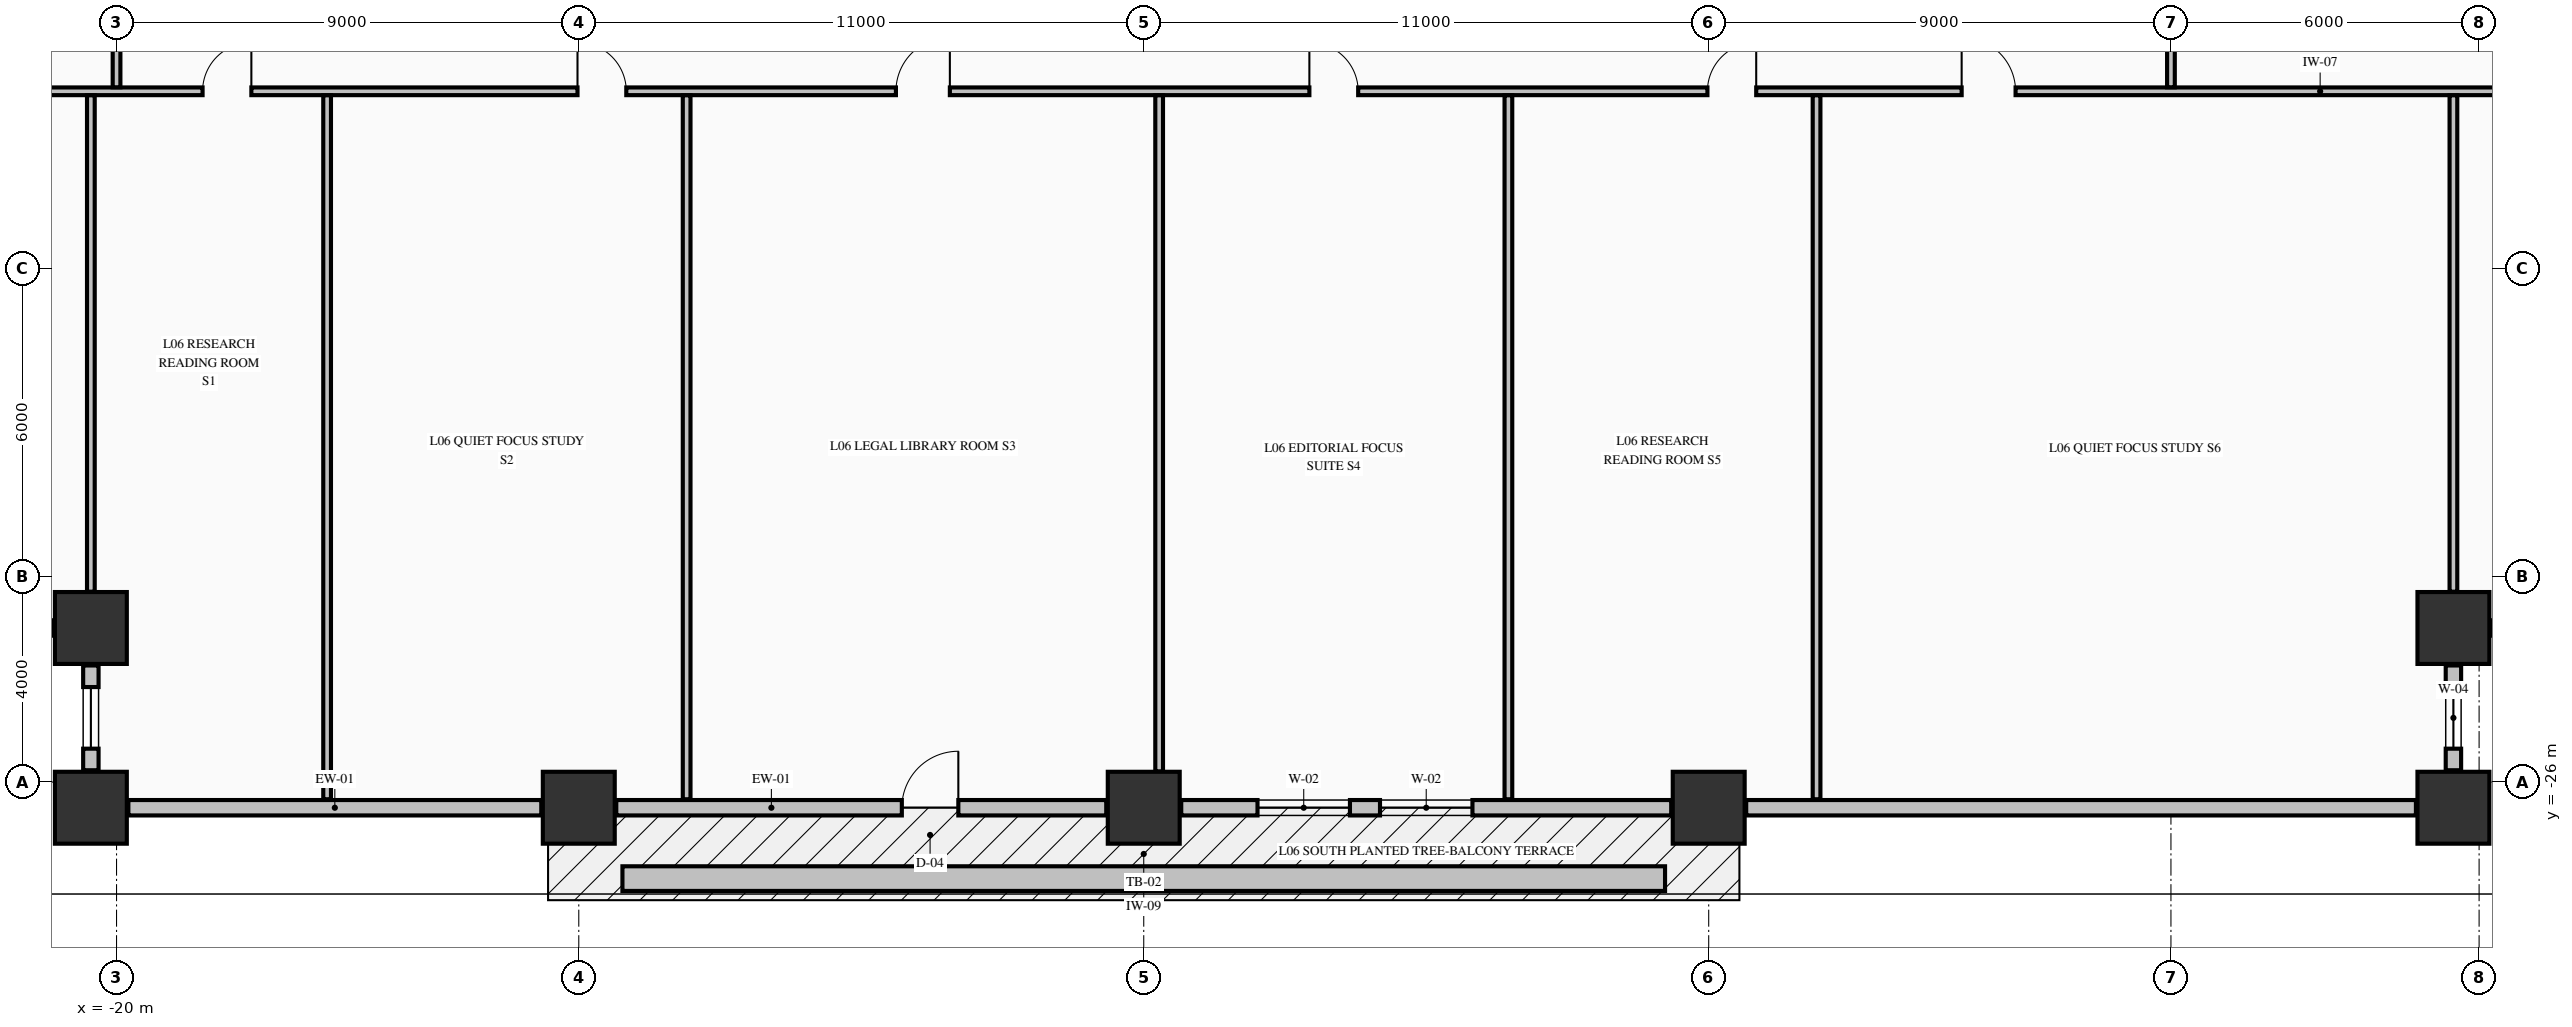
"""IFC4 building model, lengths in metres.
Left out: names, types, materials, properties, quantities, classifications, styles, units other than length and angle.
Written with IfcOpenShell. Run it as: python <this file> out.ifc"""

import sys

from ifc_helpers import new_model, si_unit, direction, frame, frame_2d, origin, origin_2d, place, context, subcontext, project, spatial, rectangle, extrude, element, fill, save


model = new_model("IFC4")
c1 = context("Model", 3, precision=1e-05, world=origin(), true_north=direction((0.0, 1.0)))
c2 = subcontext(c1, "Body", "Model", "MODEL_VIEW")
j1 = project(units=[si_unit("LENGTHUNIT", "METRE"), si_unit("PLANEANGLEUNIT", "RADIAN")], contexts=[c1])
p1 = place(None, origin())
s1 = spatial("IfcSite", under=j1, at=p1, CompositionType="ELEMENT")
p2 = place(p1, origin())
s2 = spatial("IfcBuilding", under=s1, at=p2, CompositionType="ELEMENT")
p3 = place(p2, frame((0.0, 0.0, 30.77)))
s3 = spatial("IfcBuildingStorey", under=s2, at=p3, CompositionType="ELEMENT", Elevation=30.77)
for number, where, z_axis, x_axis in (
    (1, (-20.5, -26.5, -0.25), (0.0, 0.0, 1.0), (1.0, 0.0, 0.0)),
    (2, (-11.0, -26.5, -0.25), (0.0, 0.0, 1.0), (1.0, 0.0, 0.0)),
    (3, (0.0, -26.5, -0.25), (0.0, 0.0, 1.0), (1.0, 0.0, 0.0)),
    (4, (11.0, -26.5, -0.25), (0.0, 0.0, 1.0), (1.0, 0.0, 0.0)),
    (5, (25.5, -26.5, -0.25), (0.0, 0.0, 1.0), (1.0, 0.0, 0.0)),
    (6, (-20.5, -23.0, -0.25), (0.0, 0.0, 1.0), (1.0, 0.0, 0.0)),
    (7, (25.5, -23.0, -0.25), (0.0, 0.0, 1.0), (1.0, 0.0, 0.0)),
):
    element("IfcColumn", number, at=place(p3, frame(where, z_axis=z_axis, x_axis=x_axis)), inside=s3, PredefinedType="COLUMN", context=c2, shape_type="SweptSolid", body=[
        extrude(rectangle(XDim=1.4, YDim=1.4, at=origin_2d()), origin(), (0.0, 0.0, 1.0), 3.52),
    ])
p4 = place(p3, frame((25.5, -25.77, 0.0), z_axis=(0.0, 0.0, 1.0), x_axis=(0.0, 1.0, 0.0)))
e8 = element("IfcWall", 8, at=p4, inside=s3, PredefinedType="STANDARD", context=c2, shape_type="SweptSolid", body=[
    extrude(rectangle(XDim=2.04, YDim=0.3, at=frame_2d((1.02, 0.0))), origin(), (0.0, 0.0, 1.0), 2.662),
])
p5 = place(p4, frame((0.42, 0.0, 0.82)))
e9 = element("IfcOpeningElement", 9, at=p5, cuts=e8, PredefinedType="OPENING", context=c2, shape_type="SweptSolid", body=[
    extrude(rectangle(XDim=1.2, YDim=1.65, at=frame_2d((0.6, 0.825))), frame((0.0, 0.16, 0.0), z_axis=(0.0, -1.0, 0.0), x_axis=(1.0, 0.0, 0.0)), (0.0, 0.0, 1.0), 0.32),
])
p6 = place(p3, frame((26.23, -23.0, 0.0), z_axis=(0.0, 0.0, 1.0), x_axis=(1.0, 0.0, 0.0)))
e10 = element("IfcWall", 10, at=p6, inside=s3, PredefinedType="STANDARD", context=c2, shape_type="SweptSolid", body=[
    extrude(rectangle(XDim=2.04, YDim=0.3, at=frame_2d((1.02, 0.0))), origin(), (0.0, 0.0, 1.0), 2.662),
])
p7 = place(p6, frame((0.42, 0.0, 0.82)))
e11 = element("IfcOpeningElement", 11, at=p7, cuts=e10, PredefinedType="OPENING", context=c2, shape_type="SweptSolid", body=[
    extrude(rectangle(XDim=1.2, YDim=1.65, at=frame_2d((0.6, 0.825))), frame((0.0, 0.16, 0.0), z_axis=(0.0, -1.0, 0.0), x_axis=(1.0, 0.0, 0.0)), (0.0, 0.0, 1.0), 0.32),
])
p8 = place(p3, frame((-23.27, -23.0, 0.0), z_axis=(0.0, 0.0, 1.0), x_axis=(1.0, 0.0, 0.0)))
e12 = element("IfcWall", 12, at=p8, inside=s3, PredefinedType="STANDARD", context=c2, shape_type="SweptSolid", body=[
    extrude(rectangle(XDim=2.04, YDim=0.3, at=frame_2d((1.02, 0.0))), origin(), (0.0, 0.0, 1.0), 2.662),
])
p9 = place(p8, frame((0.42, 0.0, 0.82)))
e13 = element("IfcOpeningElement", 13, at=p9, cuts=e12, PredefinedType="OPENING", context=c2, shape_type="SweptSolid", body=[
    extrude(rectangle(XDim=1.2, YDim=1.65, at=frame_2d((0.6, 0.825))), frame((0.0, 0.16, 0.0), z_axis=(0.0, -1.0, 0.0), x_axis=(1.0, 0.0, 0.0)), (0.0, 0.0, 1.0), 0.32),
])
p10 = place(p3, frame((-20.5, -23.73, 0.0), z_axis=(0.0, 0.0, 1.0), x_axis=(0.0, -1.0, 0.0)))
e14 = element("IfcWall", 14, at=p10, inside=s3, PredefinedType="STANDARD", context=c2, shape_type="SweptSolid", body=[
    extrude(rectangle(XDim=2.04, YDim=0.3, at=frame_2d((1.02, 0.0))), origin(), (0.0, 0.0, 1.0), 2.662),
])
p11 = place(p10, frame((0.42, 0.0, 0.82)))
e15 = element("IfcOpeningElement", 15, at=p11, cuts=e14, PredefinedType="OPENING", context=c2, shape_type="SweptSolid", body=[
    extrude(rectangle(XDim=1.2, YDim=1.65, at=frame_2d((0.6, 0.825))), frame((0.0, 0.16, 0.0), z_axis=(0.0, -1.0, 0.0), x_axis=(1.0, 0.0, 0.0)), (0.0, 0.0, 1.0), 0.32),
])
p12 = place(p3, frame((-19.77, -26.5, 0.0), z_axis=(0.0, 0.0, 1.0), x_axis=(1.0, 0.0, 0.0)))
e16 = element("IfcWall", 16, at=p12, inside=s3, PredefinedType="STANDARD", context=c2, shape_type="SweptSolid", body=[
    extrude(rectangle(XDim=8.04, YDim=0.3, at=frame_2d((4.02, 0.0))), origin(), (0.0, 0.0, 1.0), 2.662),
])
p13 = place(p3, frame((-10.27, -26.5, 0.0), z_axis=(0.0, 0.0, 1.0), x_axis=(1.0, 0.0, 0.0)))
e17 = element("IfcWall", 17, at=p13, inside=s3, PredefinedType="STANDARD", context=c2, shape_type="SweptSolid", body=[
    extrude(rectangle(XDim=9.54, YDim=0.3, at=frame_2d((4.77, 0.0))), origin(), (0.0, 0.0, 1.0), 2.662),
])
p14 = place(p13, frame((5.56, 0.0, 0.0)))
e18 = element("IfcOpeningElement", 18, at=p14, cuts=e17, PredefinedType="OPENING", context=c2, shape_type="SweptSolid", body=[
    extrude(rectangle(XDim=1.1, YDim=2.15, at=frame_2d((0.55, 1.075))), frame((0.0, 0.16, 0.0), z_axis=(0.0, -1.0, 0.0), x_axis=(1.0, 0.0, 0.0)), (0.0, 0.0, 1.0), 0.32),
])
p15 = place(p3, frame((0.73, -26.5, 0.0), z_axis=(0.0, 0.0, 1.0), x_axis=(1.0, 0.0, 0.0)))
e19 = element("IfcWall", 19, at=p15, inside=s3, PredefinedType="STANDARD", context=c2, shape_type="SweptSolid", body=[
    extrude(rectangle(XDim=9.54, YDim=0.3, at=frame_2d((4.77, 0.0))), origin(), (0.0, 0.0, 1.0), 2.662),
])
p16 = place(p15, frame((1.485, 0.0, 0.78)))
e20 = element("IfcOpeningElement", 20, at=p16, cuts=e19, PredefinedType="OPENING", context=c2, shape_type="SweptSolid", body=[
    extrude(rectangle(XDim=1.8, YDim=1.72, at=frame_2d((0.9, 0.86))), frame((0.0, 0.16, 0.0), z_axis=(0.0, -1.0, 0.0), x_axis=(1.0, 0.0, 0.0)), (0.0, 0.0, 1.0), 0.32),
])
p17 = place(p15, frame((3.87, 0.0, 0.78)))
e21 = element("IfcOpeningElement", 21, at=p17, cuts=e19, PredefinedType="OPENING", context=c2, shape_type="SweptSolid", body=[
    extrude(rectangle(XDim=1.8, YDim=1.72, at=frame_2d((0.9, 0.86))), frame((0.0, 0.16, 0.0), z_axis=(0.0, -1.0, 0.0), x_axis=(1.0, 0.0, 0.0)), (0.0, 0.0, 1.0), 0.32),
])
p18 = place(p3, frame((11.73, -26.5, 0.0), z_axis=(0.0, 0.0, 1.0), x_axis=(1.0, 0.0, 0.0)))
e22 = element("IfcWall", 22, at=p18, inside=s3, PredefinedType="STANDARD", context=c2, shape_type="SweptSolid", body=[
    extrude(rectangle(XDim=13.04, YDim=0.3, at=frame_2d((6.52, 0.0))), origin(), (0.0, 0.0, 1.0), 2.662),
])
p19 = place(p3, frame((-23.835, -12.55, 0.0), z_axis=(0.0, 0.0, 1.0), x_axis=(1.0, 0.0, 0.0)))
e23 = element("IfcWall", 23, at=p19, inside=s3, PredefinedType="PARTITIONING", context=c2, shape_type="SweptSolid", body=[
    extrude(rectangle(XDim=52.67, YDim=0.15, at=frame_2d((26.335, 0.0))), origin(), (0.0, 0.0, 1.0), 3.27),
])
p20 = place(p19, frame((5.51, 0.0, 0.0)))
e24 = element("IfcOpeningElement", 24, at=p20, cuts=e23, PredefinedType="OPENING", context=c2, shape_type="SweptSolid", body=[
    extrude(rectangle(XDim=0.95, YDim=2.15, at=frame_2d((0.475, 1.075))), frame((0.0, 0.085, 0.0), z_axis=(0.0, -1.0, 0.0), x_axis=(1.0, 0.0, 0.0)), (0.0, 0.0, 1.0), 0.17),
])
p21 = place(p19, frame((12.81, 0.0, 0.0)))
e25 = element("IfcOpeningElement", 25, at=p21, cuts=e23, PredefinedType="OPENING", context=c2, shape_type="SweptSolid", body=[
    extrude(rectangle(XDim=0.95, YDim=2.15, at=frame_2d((0.475, 1.075))), frame((0.0, 0.085, 0.0), z_axis=(0.0, -1.0, 0.0), x_axis=(1.0, 0.0, 0.0)), (0.0, 0.0, 1.0), 0.17),
])
p22 = place(p19, frame((19.01, 0.0, 0.0)))
e26 = element("IfcOpeningElement", 26, at=p22, cuts=e23, PredefinedType="OPENING", context=c2, shape_type="SweptSolid", body=[
    extrude(rectangle(XDim=1.05, YDim=2.15, at=frame_2d((0.525, 1.075))), frame((0.0, 0.085, 0.0), z_axis=(0.0, -1.0, 0.0), x_axis=(1.0, 0.0, 0.0)), (0.0, 0.0, 1.0), 0.17),
])
p23 = place(p19, frame((27.06, 0.0, 0.0)))
e27 = element("IfcOpeningElement", 27, at=p23, cuts=e23, PredefinedType="OPENING", context=c2, shape_type="SweptSolid", body=[
    extrude(rectangle(XDim=0.95, YDim=2.15, at=frame_2d((0.475, 1.075))), frame((0.0, 0.085, 0.0), z_axis=(0.0, -1.0, 0.0), x_axis=(1.0, 0.0, 0.0)), (0.0, 0.0, 1.0), 0.17),
])
p24 = place(p19, frame((34.81, 0.0, 0.0)))
e28 = element("IfcOpeningElement", 28, at=p24, cuts=e23, PredefinedType="OPENING", context=c2, shape_type="SweptSolid", body=[
    extrude(rectangle(XDim=0.95, YDim=2.15, at=frame_2d((0.475, 1.075))), frame((0.0, 0.085, 0.0), z_axis=(0.0, -1.0, 0.0), x_axis=(1.0, 0.0, 0.0)), (0.0, 0.0, 1.0), 0.17),
])
p25 = place(p19, frame((39.76, 0.0, 0.0)))
e29 = element("IfcOpeningElement", 29, at=p25, cuts=e23, PredefinedType="OPENING", context=c2, shape_type="SweptSolid", body=[
    extrude(rectangle(XDim=1.05, YDim=2.15, at=frame_2d((0.525, 1.075))), frame((0.0, 0.085, 0.0), z_axis=(0.0, -1.0, 0.0), x_axis=(1.0, 0.0, 0.0)), (0.0, 0.0, 1.0), 0.17),
])
p26 = place(p3, frame((-20.5, -22.294, 0.0), z_axis=(0.0, 0.0, 1.0), x_axis=(0.0, 1.0, 0.0)))
e30 = element("IfcWall", 30, at=p26, inside=s3, PredefinedType="PARTITIONING", context=c2, shape_type="SweptSolid", body=[
    extrude(rectangle(XDim=9.666, YDim=0.15, at=frame_2d((4.833, 0.0))), origin(), (0.0, 0.0, 1.0), 3.27),
])
p27 = place(p3, frame((-20.0, -12.472, 0.0), z_axis=(0.0, 0.0, 1.0), x_axis=(0.0, 1.0, 0.0)))
e31 = element("IfcWall", 31, at=p27, inside=s3, PredefinedType="PARTITIONING", context=c2, shape_type="SweptSolid", body=[
    extrude(rectangle(XDim=1.916, YDim=0.15, at=frame_2d((0.958, 0.0))), origin(), (0.0, 0.0, 1.0), 3.27),
])
p28 = place(p27, frame((0.747, 0.0, 0.0)))
e32 = element("IfcOpeningElement", 32, at=p28, cuts=e31, PredefinedType="OPENING", context=c2, shape_type="SweptSolid", body=[
    extrude(rectangle(XDim=0.95, YDim=2.15, at=frame_2d((0.475, 1.075))), frame((0.0, 0.085, 0.0), z_axis=(0.0, -1.0, 0.0), x_axis=(1.0, 0.0, 0.0)), (0.0, 0.0, 1.0), 0.17),
])
for number, where, z_axis, x_axis in (
    (33, (-15.9, -26.335, 0.0), (0.0, 0.0, 1.0), (0.0, 1.0, 0.0)),
    (34, (-8.9, -26.335, 0.0), (0.0, 0.0, 1.0), (0.0, 1.0, 0.0)),
):
    element("IfcWall", number, at=place(p3, frame(where, z_axis=z_axis, x_axis=x_axis)), inside=s3, PredefinedType="PARTITIONING", context=c2, shape_type="SweptSolid", body=[
        extrude(rectangle(XDim=13.707, YDim=0.15, at=frame_2d((6.854, 0.0))), origin(), (0.0, 0.0, 1.0), 3.27),
    ])
p29 = place(p3, frame((0.3, -25.794, 0.0), z_axis=(0.0, 0.0, 1.0), x_axis=(0.0, 1.0, 0.0)))
e35 = element("IfcWall", 35, at=p29, inside=s3, PredefinedType="PARTITIONING", context=c2, shape_type="SweptSolid", body=[
    extrude(rectangle(XDim=13.166, YDim=0.15, at=frame_2d((6.583, 0.0))), origin(), (0.0, 0.0, 1.0), 2.61),
])
for number, where, z_axis, x_axis in (
    (36, (7.1, -26.335, 0.0), (0.0, 0.0, 1.0), (0.0, 1.0, 0.0)),
    (37, (13.1, -26.335, 0.0), (0.0, 0.0, 1.0), (0.0, 1.0, 0.0)),
):
    element("IfcWall", number, at=place(p3, frame(where, z_axis=z_axis, x_axis=x_axis)), inside=s3, PredefinedType="PARTITIONING", context=c2, shape_type="SweptSolid", body=[
        extrude(rectangle(XDim=13.707, YDim=0.15, at=frame_2d((6.854, 0.0))), origin(), (0.0, 0.0, 1.0), 3.27),
    ])
p30 = place(p3, frame((20.0, -12.472, 0.0), z_axis=(0.0, 0.0, 1.0), x_axis=(0.0, 1.0, 0.0)))
e38 = element("IfcWall", 38, at=p30, inside=s3, PredefinedType="PARTITIONING", context=c2, shape_type="SweptSolid", body=[
    extrude(rectangle(XDim=1.916, YDim=0.15, at=frame_2d((0.958, 0.0))), origin(), (0.0, 0.0, 1.0), 2.61),
])
p31 = place(p30, frame((0.747, 0.0, 0.0)))
e39 = element("IfcOpeningElement", 39, at=p31, cuts=e38, PredefinedType="OPENING", context=c2, shape_type="SweptSolid", body=[
    extrude(rectangle(XDim=0.95, YDim=2.15, at=frame_2d((0.475, 1.075))), frame((0.0, 0.085, 0.0), z_axis=(0.0, -1.0, 0.0), x_axis=(1.0, 0.0, 0.0)), (0.0, 0.0, 1.0), 0.17),
])
p32 = place(p3, frame((25.5, -22.294, 0.0), z_axis=(0.0, 0.0, 1.0), x_axis=(0.0, 1.0, 0.0)))
e40 = element("IfcWall", 40, at=p32, inside=s3, PredefinedType="PARTITIONING", context=c2, shape_type="SweptSolid", body=[
    extrude(rectangle(XDim=9.666, YDim=0.15, at=frame_2d((4.833, 0.0))), origin(), (0.0, 0.0, 1.0), 3.27),
])
p33 = place(p3, frame((-10.15, -27.88, -0.04), z_axis=(0.0, 0.0, 1.0), x_axis=(1.0, 0.0, 0.0)))
e41 = element("IfcWall", 41, at=p33, inside=s3, PredefinedType="PARAPET", context=c2, shape_type="SweptSolid", body=[
    extrude(rectangle(XDim=20.3, YDim=0.48, at=frame_2d((10.15, 0.0))), origin(), (0.0, 0.0, 1.0), 0.52),
])
p34 = place(p5, origin())
e42 = element("IfcWindow", 42, at=p34, inside=s3, PartitioningType="SINGLE_PANEL", PredefinedType="WINDOW", context=c2, shape_type="SweptSolid", body=[
    extrude(rectangle(XDim=1.2, YDim=1.65, at=frame_2d((0.6, 0.825))), frame((0.0, 0.03, 0.0), z_axis=(0.0, -1.0, 0.0), x_axis=(1.0, 0.0, 0.0)), (0.0, 0.0, 1.0), 0.06),
])
fill(e9, e42)
p35 = place(p11, origin())
e43 = element("IfcWindow", 43, at=p35, inside=s3, PartitioningType="SINGLE_PANEL", PredefinedType="WINDOW", context=c2, shape_type="SweptSolid", body=[
    extrude(rectangle(XDim=1.2, YDim=1.65, at=frame_2d((0.6, 0.825))), frame((0.0, 0.03, 0.0), z_axis=(0.0, -1.0, 0.0), x_axis=(1.0, 0.0, 0.0)), (0.0, 0.0, 1.0), 0.06),
])
fill(e15, e43)
p36 = place(p14, origin())
e44 = element("IfcDoor", 44, at=p36, inside=s3, OperationType="SINGLE_SWING_RIGHT", PredefinedType="DOOR", context=c2, shape_type="SweptSolid", body=[
    extrude(rectangle(XDim=1.1, YDim=2.15, at=frame_2d((0.55, 1.075))), frame((0.0, 0.025, 0.0), z_axis=(0.0, -1.0, 0.0), x_axis=(1.0, 0.0, 0.0)), (0.0, 0.0, 1.0), 0.05),
])
fill(e18, e44)
p37 = place(p16, origin())
e45 = element("IfcWindow", 45, at=p37, inside=s3, PartitioningType="SINGLE_PANEL", PredefinedType="WINDOW", context=c2, shape_type="SweptSolid", body=[
    extrude(rectangle(XDim=1.8, YDim=1.72, at=frame_2d((0.9, 0.86))), frame((0.0, 0.03, 0.0), z_axis=(0.0, -1.0, 0.0), x_axis=(1.0, 0.0, 0.0)), (0.0, 0.0, 1.0), 0.06),
])
fill(e20, e45)
p38 = place(p17, origin())
e46 = element("IfcWindow", 46, at=p38, inside=s3, PartitioningType="SINGLE_PANEL", PredefinedType="WINDOW", context=c2, shape_type="SweptSolid", body=[
    extrude(rectangle(XDim=1.8, YDim=1.72, at=frame_2d((0.9, 0.86))), frame((0.0, 0.03, 0.0), z_axis=(0.0, -1.0, 0.0), x_axis=(1.0, 0.0, 0.0)), (0.0, 0.0, 1.0), 0.06),
])
fill(e21, e46)
p39 = place(p20, origin())
e47 = element("IfcDoor", 47, at=p39, inside=s3, OperationType="SINGLE_SWING_RIGHT", PredefinedType="DOOR", context=c2, shape_type="SweptSolid", body=[
    extrude(rectangle(XDim=0.95, YDim=2.15, at=frame_2d((0.475, 1.075))), frame((0.0, 0.025, 0.0), z_axis=(0.0, -1.0, 0.0), x_axis=(1.0, 0.0, 0.0)), (0.0, 0.0, 1.0), 0.05),
])
fill(e24, e47)
p40 = place(p21, origin())
e48 = element("IfcDoor", 48, at=p40, inside=s3, OperationType="SINGLE_SWING_LEFT", PredefinedType="DOOR", context=c2, shape_type="SweptSolid", body=[
    extrude(rectangle(XDim=0.95, YDim=2.15, at=frame_2d((0.475, 1.075))), frame((0.0, 0.025, 0.0), z_axis=(0.0, -1.0, 0.0), x_axis=(1.0, 0.0, 0.0)), (0.0, 0.0, 1.0), 0.05),
])
fill(e25, e48)
p41 = place(p22, origin())
e49 = element("IfcDoor", 49, at=p41, inside=s3, OperationType="SINGLE_SWING_RIGHT", PredefinedType="DOOR", context=c2, shape_type="SweptSolid", body=[
    extrude(rectangle(XDim=1.05, YDim=2.15, at=frame_2d((0.525, 1.075))), frame((0.0, 0.025, 0.0), z_axis=(0.0, -1.0, 0.0), x_axis=(1.0, 0.0, 0.0)), (0.0, 0.0, 1.0), 0.05),
])
fill(e26, e49)
p42 = place(p23, origin())
e50 = element("IfcDoor", 50, at=p42, inside=s3, OperationType="SINGLE_SWING_LEFT", PredefinedType="DOOR", context=c2, shape_type="SweptSolid", body=[
    extrude(rectangle(XDim=0.95, YDim=2.15, at=frame_2d((0.475, 1.075))), frame((0.0, 0.025, 0.0), z_axis=(0.0, -1.0, 0.0), x_axis=(1.0, 0.0, 0.0)), (0.0, 0.0, 1.0), 0.05),
])
fill(e27, e50)
p43 = place(p24, origin())
e51 = element("IfcDoor", 51, at=p43, inside=s3, OperationType="SINGLE_SWING_RIGHT", PredefinedType="DOOR", context=c2, shape_type="SweptSolid", body=[
    extrude(rectangle(XDim=0.95, YDim=2.15, at=frame_2d((0.475, 1.075))), frame((0.0, 0.025, 0.0), z_axis=(0.0, -1.0, 0.0), x_axis=(1.0, 0.0, 0.0)), (0.0, 0.0, 1.0), 0.05),
])
fill(e28, e51)
p44 = place(p25, origin())
e52 = element("IfcDoor", 52, at=p44, inside=s3, OperationType="SINGLE_SWING_LEFT", PredefinedType="DOOR", context=c2, shape_type="SweptSolid", body=[
    extrude(rectangle(XDim=1.05, YDim=2.15, at=frame_2d((0.525, 1.075))), frame((0.0, 0.025, 0.0), z_axis=(0.0, -1.0, 0.0), x_axis=(1.0, 0.0, 0.0)), (0.0, 0.0, 1.0), 0.05),
])
fill(e29, e52)
save(model, sys.argv[1])
